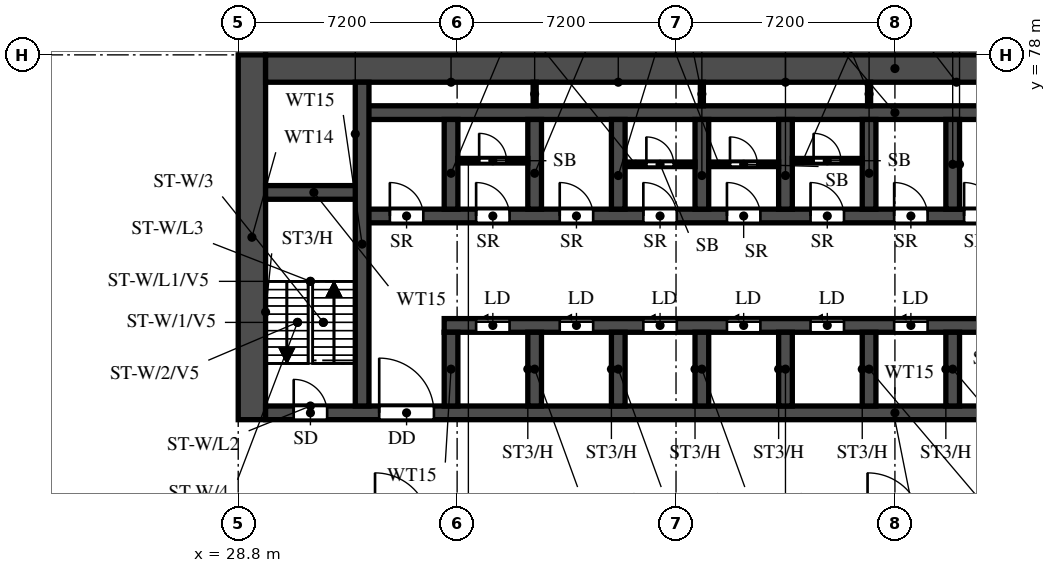
"""IFC4 building model, lengths in metres.
Left out: names, types, materials, properties, quantities, classifications, styles, units other than length and angle.
Written with IfcOpenShell. Run it as: python <this file> out.ifc"""

import sys

from ifc_helpers import new_model, si_unit, direction, frame, frame_2d, origin, place, context, subcontext, project, spatial, rectangle, extrude, element, fill, save


model = new_model("IFC4")
c1 = context("Model", 3, precision=1e-05, world=origin(), true_north=direction((0.0, 1.0)))
c2 = subcontext(c1, "Body", "Model", "MODEL_VIEW")
j1 = project(units=[si_unit("LENGTHUNIT", "METRE"), si_unit("PLANEANGLEUNIT", "RADIAN")], contexts=[c1])
p1 = place(None, origin())
s1 = spatial("IfcSite", under=j1, at=p1, CompositionType="ELEMENT")
p2 = place(p1, origin())
s2 = spatial("IfcBuilding", under=s1, at=p2, CompositionType="ELEMENT")
p3 = place(p2, origin())
s3 = spatial("IfcBuildingStorey", under=s2, at=p3, CompositionType="ELEMENT", Elevation=0.0)
p4 = place(p3, frame((29.25, 66.0, 0.0), z_axis=(0.0, 0.0, 1.0), x_axis=(0.0, 1.0, 0.0)))
e1 = element("IfcWall", 1, at=p4, inside=s3, PredefinedType="SHEAR", context=c2, shape_type="SweptSolid", body=[
    extrude(rectangle(XDim=12.0, YDim=0.9, at=frame_2d((6.0, 0.0))), origin(), (0.0, 0.0, 1.0), 7.4),
])
p5 = place(p3, frame((29.7, 77.55, 0.0), z_axis=(0.0, 0.0, 1.0), x_axis=(1.0, 0.0, 0.0)))
e2 = element("IfcWall", 2, at=p5, inside=s3, PredefinedType="SHEAR", context=c2, shape_type="SweptSolid", body=[
    extrude(rectangle(XDim=41.4, YDim=0.9, at=frame_2d((20.7, 0.0))), origin(), (0.0, 0.0, 1.0), 7.4),
])
p6 = place(p3, frame((29.7, 66.225, 0.0), z_axis=(0.0, 0.0, 1.0), x_axis=(1.0, 0.0, 0.0)))
e3 = element("IfcWall", 3, at=p6, inside=s3, PredefinedType="SHEAR", context=c2, shape_type="SweptSolid", body=[
    extrude(rectangle(XDim=41.4, YDim=0.45, at=frame_2d((20.7, 0.0))), origin(), (0.0, 0.0, 1.0), 7.4),
])
p7 = place(p6, frame((0.925, 0.0, 0.0)))
e4 = element("IfcOpeningElement", 4, at=p7, cuts=e3, PredefinedType="OPENING", context=c2, shape_type="SweptSolid", body=[
    extrude(rectangle(XDim=1.1, YDim=2.1, at=frame_2d((0.55, 1.05))), frame((0.0, 0.235, 0.0), z_axis=(0.0, -1.0, 0.0), x_axis=(1.0, 0.0, 0.0)), (0.0, 0.0, 1.0), 0.47),
])
p8 = place(p6, frame((3.738, 0.0, 0.0)))
e5 = element("IfcOpeningElement", 5, at=p8, cuts=e3, PredefinedType="OPENING", context=c2, shape_type="SweptSolid", body=[
    extrude(rectangle(XDim=1.8, YDim=2.1, at=frame_2d((0.9, 1.05))), frame((0.0, 0.235, 0.0), z_axis=(0.0, -1.0, 0.0), x_axis=(1.0, 0.0, 0.0)), (0.0, 0.0, 1.0), 0.47),
])
p9 = place(p3, frame((35.575, 69.1, 0.0), z_axis=(0.0, 0.0, 1.0), x_axis=(1.0, 0.0, 0.0)))
e6 = element("IfcWall", 6, at=p9, inside=s3, PredefinedType="SHEAR", context=c2, shape_type="SweptSolid", body=[
    extrude(rectangle(XDim=24.2, YDim=0.45, at=frame_2d((12.1, 0.0))), origin(), (0.0, 0.0, 1.0), 7.4),
])
p10 = place(p9, frame((1.05, 0.0, 0.0)))
e7 = element("IfcOpeningElement", 7, at=p10, cuts=e6, PredefinedType="OPENING", context=c2, shape_type="SweptSolid", body=[
    extrude(rectangle(XDim=1.1, YDim=2.1, at=frame_2d((0.55, 1.05))), frame((0.0, 0.235, 0.0), z_axis=(0.0, -1.0, 0.0), x_axis=(1.0, 0.0, 0.0)), (0.0, 0.0, 1.0), 0.47),
])
p11 = place(p9, frame((3.8, 0.0, 0.0)))
e8 = element("IfcOpeningElement", 8, at=p11, cuts=e6, PredefinedType="OPENING", context=c2, shape_type="SweptSolid", body=[
    extrude(rectangle(XDim=1.1, YDim=2.1, at=frame_2d((0.55, 1.05))), frame((0.0, 0.235, 0.0), z_axis=(0.0, -1.0, 0.0), x_axis=(1.0, 0.0, 0.0)), (0.0, 0.0, 1.0), 0.47),
])
p12 = place(p9, frame((6.55, 0.0, 0.0)))
e9 = element("IfcOpeningElement", 9, at=p12, cuts=e6, PredefinedType="OPENING", context=c2, shape_type="SweptSolid", body=[
    extrude(rectangle(XDim=1.1, YDim=2.1, at=frame_2d((0.55, 1.05))), frame((0.0, 0.235, 0.0), z_axis=(0.0, -1.0, 0.0), x_axis=(1.0, 0.0, 0.0)), (0.0, 0.0, 1.0), 0.47),
])
p13 = place(p9, frame((9.3, 0.0, 0.0)))
e10 = element("IfcOpeningElement", 10, at=p13, cuts=e6, PredefinedType="OPENING", context=c2, shape_type="SweptSolid", body=[
    extrude(rectangle(XDim=1.1, YDim=2.1, at=frame_2d((0.55, 1.05))), frame((0.0, 0.235, 0.0), z_axis=(0.0, -1.0, 0.0), x_axis=(1.0, 0.0, 0.0)), (0.0, 0.0, 1.0), 0.47),
])
p14 = place(p9, frame((12.05, 0.0, 0.0)))
e11 = element("IfcOpeningElement", 11, at=p14, cuts=e6, PredefinedType="OPENING", context=c2, shape_type="SweptSolid", body=[
    extrude(rectangle(XDim=1.1, YDim=2.1, at=frame_2d((0.55, 1.05))), frame((0.0, 0.235, 0.0), z_axis=(0.0, -1.0, 0.0), x_axis=(1.0, 0.0, 0.0)), (0.0, 0.0, 1.0), 0.47),
])
p15 = place(p9, frame((14.8, 0.0, 0.0)))
e12 = element("IfcOpeningElement", 12, at=p15, cuts=e6, PredefinedType="OPENING", context=c2, shape_type="SweptSolid", body=[
    extrude(rectangle(XDim=1.1, YDim=2.1, at=frame_2d((0.55, 1.05))), frame((0.0, 0.235, 0.0), z_axis=(0.0, -1.0, 0.0), x_axis=(1.0, 0.0, 0.0)), (0.0, 0.0, 1.0), 0.47),
])
p16 = place(p9, frame((17.675, 0.0, 0.0)))
e13 = element("IfcOpeningElement", 13, at=p16, cuts=e6, PredefinedType="OPENING", context=c2, shape_type="SweptSolid", body=[
    extrude(rectangle(XDim=1.1, YDim=2.1, at=frame_2d((0.55, 1.05))), frame((0.0, 0.235, 0.0), z_axis=(0.0, -1.0, 0.0), x_axis=(1.0, 0.0, 0.0)), (0.0, 0.0, 1.0), 0.47),
])
p17 = place(p9, frame((20.675, 0.0, 0.0)))
e14 = element("IfcOpeningElement", 14, at=p17, cuts=e6, PredefinedType="OPENING", context=c2, shape_type="SweptSolid", body=[
    extrude(rectangle(XDim=1.1, YDim=2.1, at=frame_2d((0.55, 1.05))), frame((0.0, 0.235, 0.0), z_axis=(0.0, -1.0, 0.0), x_axis=(1.0, 0.0, 0.0)), (0.0, 0.0, 1.0), 0.47),
])
p18 = place(p3, frame((32.875, 72.7, 0.0), z_axis=(0.0, 0.0, 1.0), x_axis=(1.0, 0.0, 0.0)))
e15 = element("IfcWall", 15, at=p18, inside=s3, PredefinedType="SHEAR", context=c2, shape_type="SweptSolid", body=[
    extrude(rectangle(XDim=35.05, YDim=0.45, at=frame_2d((17.525, 0.0))), origin(), (0.0, 0.0, 1.0), 7.4),
])
p19 = place(p18, frame((19.8, 0.0, 0.0)))
e16 = element("IfcOpeningElement", 16, at=p19, cuts=e15, PredefinedType="OPENING", context=c2, shape_type="SweptSolid", body=[
    extrude(rectangle(XDim=1.1, YDim=2.1, at=frame_2d((0.55, 1.05))), frame((0.0, 0.235, 0.0), z_axis=(0.0, -1.0, 0.0), x_axis=(1.0, 0.0, 0.0)), (0.0, 0.0, 1.0), 0.47),
])
p20 = place(p18, frame((27.65, 0.0, 0.0)))
e17 = element("IfcOpeningElement", 17, at=p20, cuts=e15, PredefinedType="OPENING", context=c2, shape_type="SweptSolid", body=[
    extrude(rectangle(XDim=1.1, YDim=2.1, at=frame_2d((0.55, 1.05))), frame((0.0, 0.235, 0.0), z_axis=(0.0, -1.0, 0.0), x_axis=(1.0, 0.0, 0.0)), (0.0, 0.0, 1.0), 0.47),
])
p21 = place(p18, frame((30.25, 0.0, 0.0)))
e18 = element("IfcOpeningElement", 18, at=p21, cuts=e15, PredefinedType="OPENING", context=c2, shape_type="SweptSolid", body=[
    extrude(rectangle(XDim=1.1, YDim=2.1, at=frame_2d((0.55, 1.05))), frame((0.0, 0.235, 0.0), z_axis=(0.0, -1.0, 0.0), x_axis=(1.0, 0.0, 0.0)), (0.0, 0.0, 1.0), 0.47),
])
p22 = place(p18, frame((3.75, 0.0, 0.0)))
e19 = element("IfcOpeningElement", 19, at=p22, cuts=e15, PredefinedType="OPENING", context=c2, shape_type="SweptSolid", body=[
    extrude(rectangle(XDim=1.1, YDim=2.1, at=frame_2d((0.55, 1.05))), frame((0.0, 0.235, 0.0), z_axis=(0.0, -1.0, 0.0), x_axis=(1.0, 0.0, 0.0)), (0.0, 0.0, 1.0), 0.47),
])
p23 = place(p18, frame((6.5, 0.0, 0.0)))
e20 = element("IfcOpeningElement", 20, at=p23, cuts=e15, PredefinedType="OPENING", context=c2, shape_type="SweptSolid", body=[
    extrude(rectangle(XDim=1.1, YDim=2.1, at=frame_2d((0.55, 1.05))), frame((0.0, 0.235, 0.0), z_axis=(0.0, -1.0, 0.0), x_axis=(1.0, 0.0, 0.0)), (0.0, 0.0, 1.0), 0.47),
])
p24 = place(p18, frame((9.25, 0.0, 0.0)))
e21 = element("IfcOpeningElement", 21, at=p24, cuts=e15, PredefinedType="OPENING", context=c2, shape_type="SweptSolid", body=[
    extrude(rectangle(XDim=1.1, YDim=2.1, at=frame_2d((0.55, 1.05))), frame((0.0, 0.235, 0.0), z_axis=(0.0, -1.0, 0.0), x_axis=(1.0, 0.0, 0.0)), (0.0, 0.0, 1.0), 0.47),
])
p25 = place(p18, frame((12.0, 0.0, 0.0)))
e22 = element("IfcOpeningElement", 22, at=p25, cuts=e15, PredefinedType="OPENING", context=c2, shape_type="SweptSolid", body=[
    extrude(rectangle(XDim=1.1, YDim=2.1, at=frame_2d((0.55, 1.05))), frame((0.0, 0.235, 0.0), z_axis=(0.0, -1.0, 0.0), x_axis=(1.0, 0.0, 0.0)), (0.0, 0.0, 1.0), 0.47),
])
p26 = place(p18, frame((14.75, 0.0, 0.0)))
e23 = element("IfcOpeningElement", 23, at=p26, cuts=e15, PredefinedType="OPENING", context=c2, shape_type="SweptSolid", body=[
    extrude(rectangle(XDim=1.1, YDim=2.1, at=frame_2d((0.55, 1.05))), frame((0.0, 0.235, 0.0), z_axis=(0.0, -1.0, 0.0), x_axis=(1.0, 0.0, 0.0)), (0.0, 0.0, 1.0), 0.47),
])
p27 = place(p18, frame((17.5, 0.0, 0.0)))
e24 = element("IfcOpeningElement", 24, at=p27, cuts=e15, PredefinedType="OPENING", context=c2, shape_type="SweptSolid", body=[
    extrude(rectangle(XDim=1.1, YDim=2.1, at=frame_2d((0.55, 1.05))), frame((0.0, 0.235, 0.0), z_axis=(0.0, -1.0, 0.0), x_axis=(1.0, 0.0, 0.0)), (0.0, 0.0, 1.0), 0.47),
])
p28 = place(p18, frame((0.913, 0.0, 0.0)))
e25 = element("IfcOpeningElement", 25, at=p28, cuts=e15, PredefinedType="OPENING", context=c2, shape_type="SweptSolid", body=[
    extrude(rectangle(XDim=1.1, YDim=2.1, at=frame_2d((0.55, 1.05))), frame((0.0, 0.235, 0.0), z_axis=(0.0, -1.0, 0.0), x_axis=(1.0, 0.0, 0.0)), (0.0, 0.0, 1.0), 0.47),
])
p29 = place(p3, frame((32.875, 76.1, 0.0), z_axis=(0.0, 0.0, 1.0), x_axis=(1.0, 0.0, 0.0)))
e26 = element("IfcWall", 26, at=p29, inside=s3, PredefinedType="SHEAR", context=c2, shape_type="SweptSolid", body=[
    extrude(rectangle(XDim=35.05, YDim=0.45, at=frame_2d((17.525, 0.0))), origin(), (0.0, 0.0, 1.0), 7.4),
])
p30 = place(p3, frame((29.7, 73.475, 0.0), z_axis=(0.0, 0.0, 1.0), x_axis=(1.0, 0.0, 0.0)))
e27 = element("IfcWall", 27, at=p30, inside=s3, PredefinedType="SHEAR", context=c2, shape_type="SweptSolid", body=[
    extrude(rectangle(XDim=3.175, YDim=0.45, at=frame_2d((1.587, 0.0))), origin(), (0.0, 0.0, 1.0), 7.4),
])
p31 = place(p3, frame((32.875, 66.45, 0.0), z_axis=(0.0, 0.0, 1.0), x_axis=(0.0, 1.0, 0.0)))
e28 = element("IfcWall", 28, at=p31, inside=s3, PredefinedType="SHEAR", context=c2, shape_type="SweptSolid", body=[
    extrude(rectangle(XDim=10.65, YDim=0.45, at=frame_2d((5.325, 0.0))), origin(), (0.0, 0.0, 1.0), 7.4),
])
for number, where, z_axis, x_axis in (
    (29, (35.8, 66.45, 0.0), (0.0, 0.0, 1.0), (0.0, 1.0, 0.0)),
    (30, (38.55, 66.45, 0.0), (0.0, 0.0, 1.0), (0.0, 1.0, 0.0)),
    (31, (41.3, 66.45, 0.0), (0.0, 0.0, 1.0), (0.0, 1.0, 0.0)),
    (32, (44.05, 66.45, 0.0), (0.0, 0.0, 1.0), (0.0, 1.0, 0.0)),
    (33, (46.8, 66.45, 0.0), (0.0, 0.0, 1.0), (0.0, 1.0, 0.0)),
    (34, (49.55, 66.45, 0.0), (0.0, 0.0, 1.0), (0.0, 1.0, 0.0)),
    (35, (52.3, 66.45, 0.0), (0.0, 0.0, 1.0), (0.0, 1.0, 0.0)),
):
    element("IfcWall", number, at=place(p3, frame(where, z_axis=z_axis, x_axis=x_axis)), inside=s3, PredefinedType="SHEAR", context=c2, shape_type="SweptSolid", body=[
        extrude(rectangle(XDim=2.425, YDim=0.45, at=frame_2d((1.212, 0.0))), origin(), (0.0, 0.0, 1.0), 7.4),
    ])
for number, where, z_axis, x_axis in (
    (36, (35.8, 72.925, 0.0), (0.0, 0.0, 1.0), (0.0, 1.0, 0.0)),
    (37, (38.55, 72.925, 0.0), (0.0, 0.0, 1.0), (0.0, 1.0, 0.0)),
    (38, (41.3, 72.925, 0.0), (0.0, 0.0, 1.0), (0.0, 1.0, 0.0)),
    (39, (44.05, 72.925, 0.0), (0.0, 0.0, 1.0), (0.0, 1.0, 0.0)),
    (40, (46.8, 72.925, 0.0), (0.0, 0.0, 1.0), (0.0, 1.0, 0.0)),
    (41, (49.55, 72.925, 0.0), (0.0, 0.0, 1.0), (0.0, 1.0, 0.0)),
    (42, (52.3, 72.925, 0.0), (0.0, 0.0, 1.0), (0.0, 1.0, 0.0)),
):
    element("IfcWall", number, at=place(p3, frame(where, z_axis=z_axis, x_axis=x_axis)), inside=s3, PredefinedType="SHEAR", context=c2, shape_type="SweptSolid", body=[
        extrude(rectangle(XDim=2.95, YDim=0.45, at=frame_2d((1.475, 0.0))), origin(), (0.0, 0.0, 1.0), 7.4),
    ])
p32 = place(p3, frame((36.025, 74.518, 0.0), z_axis=(0.0, 0.0, 1.0), x_axis=(1.0, 0.0, 0.0)))
e43 = element("IfcWall", 43, at=p32, inside=s3, PredefinedType="PARTITIONING", context=c2, shape_type="SweptSolid", body=[
    extrude(rectangle(XDim=2.3, YDim=0.15, at=frame_2d((1.15, 0.0))), origin(), (0.0, 0.0, 1.0), 7.4),
])
p33 = place(p32, frame((0.7, 0.0, 0.0)))
e44 = element("IfcOpeningElement", 44, at=p33, cuts=e43, PredefinedType="OPENING", context=c2, shape_type="SweptSolid", body=[
    extrude(rectangle(XDim=0.9, YDim=2.1, at=frame_2d((0.45, 1.05))), frame((0.0, 0.085, 0.0), z_axis=(0.0, -1.0, 0.0), x_axis=(1.0, 0.0, 0.0)), (0.0, 0.0, 1.0), 0.17),
])
p34 = place(p3, frame((41.525, 74.4, 0.0), z_axis=(0.0, 0.0, 1.0), x_axis=(1.0, 0.0, 0.0)))
e45 = element("IfcWall", 45, at=p34, inside=s3, PredefinedType="PARTITIONING", context=c2, shape_type="SweptSolid", body=[
    extrude(rectangle(XDim=2.3, YDim=0.15, at=frame_2d((1.15, 0.0))), origin(), (0.0, 0.0, 1.0), 7.4),
])
p35 = place(p34, frame((0.7, 0.0, 0.0)))
e46 = element("IfcOpeningElement", 46, at=p35, cuts=e45, PredefinedType="OPENING", context=c2, shape_type="SweptSolid", body=[
    extrude(rectangle(XDim=0.9, YDim=2.1, at=frame_2d((0.45, 1.05))), frame((0.0, 0.085, 0.0), z_axis=(0.0, -1.0, 0.0), x_axis=(1.0, 0.0, 0.0)), (0.0, 0.0, 1.0), 0.17),
])
p36 = place(p3, frame((44.275, 74.4, 0.0), z_axis=(0.0, 0.0, 1.0), x_axis=(1.0, 0.0, 0.0)))
e47 = element("IfcWall", 47, at=p36, inside=s3, PredefinedType="PARTITIONING", context=c2, shape_type="SweptSolid", body=[
    extrude(rectangle(XDim=2.3, YDim=0.15, at=frame_2d((1.15, 0.0))), origin(), (0.0, 0.0, 1.0), 7.4),
])
p37 = place(p36, frame((0.7, 0.0, 0.0)))
e48 = element("IfcOpeningElement", 48, at=p37, cuts=e47, PredefinedType="OPENING", context=c2, shape_type="SweptSolid", body=[
    extrude(rectangle(XDim=0.9, YDim=2.1, at=frame_2d((0.45, 1.05))), frame((0.0, 0.085, 0.0), z_axis=(0.0, -1.0, 0.0), x_axis=(1.0, 0.0, 0.0)), (0.0, 0.0, 1.0), 0.17),
])
p38 = place(p3, frame((47.025, 74.518, 0.0), z_axis=(0.0, 0.0, 1.0), x_axis=(1.0, 0.0, 0.0)))
e49 = element("IfcWall", 49, at=p38, inside=s3, PredefinedType="PARTITIONING", context=c2, shape_type="SweptSolid", body=[
    extrude(rectangle(XDim=2.3, YDim=0.15, at=frame_2d((1.15, 0.0))), origin(), (0.0, 0.0, 1.0), 7.4),
])
p39 = place(p38, frame((0.7, 0.0, 0.0)))
e50 = element("IfcOpeningElement", 50, at=p39, cuts=e49, PredefinedType="OPENING", context=c2, shape_type="SweptSolid", body=[
    extrude(rectangle(XDim=0.9, YDim=2.1, at=frame_2d((0.45, 1.05))), frame((0.0, 0.085, 0.0), z_axis=(0.0, -1.0, 0.0), x_axis=(1.0, 0.0, 0.0)), (0.0, 0.0, 1.0), 0.17),
])
for number, where, z_axis, x_axis in (
    (51, (38.55, 76.325, 0.0), (0.0, 0.0, 1.0), (0.0, 1.0, 0.0)),
    (52, (44.05, 76.325, 0.0), (0.0, 0.0, 1.0), (0.0, 1.0, 0.0)),
    (53, (49.55, 76.325, 0.0), (0.0, 0.0, 1.0), (0.0, 1.0, 0.0)),
):
    element("IfcWall", number, at=place(p3, frame(where, z_axis=z_axis, x_axis=x_axis)), inside=s3, PredefinedType="PARTITIONING", context=c2, shape_type="SweptSolid", body=[
        extrude(rectangle(XDim=0.775, YDim=0.1, at=frame_2d((0.388, 0.0))), origin(), (0.0, 0.0, 1.0), 7.4),
    ])
p40 = place(p7, origin())
e54 = element("IfcDoor", 54, at=p40, inside=s3, OperationType="SINGLE_SWING_LEFT", PredefinedType="DOOR", context=c2, shape_type="SweptSolid", body=[
    extrude(rectangle(XDim=1.1, YDim=2.1, at=frame_2d((0.55, 1.05))), frame((0.0, 0.025, 0.0), z_axis=(0.0, -1.0, 0.0), x_axis=(1.0, 0.0, 0.0)), (0.0, 0.0, 1.0), 0.05),
])
fill(e4, e54)
p41 = place(p19, origin())
e55 = element("IfcDoor", 55, at=p41, inside=s3, OperationType="SINGLE_SWING_LEFT", PredefinedType="DOOR", context=c2, shape_type="SweptSolid", body=[
    extrude(rectangle(XDim=1.1, YDim=2.1, at=frame_2d((0.55, 1.05))), frame((0.0, 0.025, 0.0), z_axis=(0.0, -1.0, 0.0), x_axis=(1.0, 0.0, 0.0)), (0.0, 0.0, 1.0), 0.05),
])
fill(e16, e55)
p42 = place(p8, origin())
e56 = element("IfcDoor", 56, at=p42, inside=s3, OperationType="DOUBLE_DOOR_SINGLE_SWING", PredefinedType="DOOR", context=c2, shape_type="SweptSolid", body=[
    extrude(rectangle(XDim=1.8, YDim=2.1, at=frame_2d((0.9, 1.05))), frame((0.0, 0.025, 0.0), z_axis=(0.0, -1.0, 0.0), x_axis=(1.0, 0.0, 0.0)), (0.0, 0.0, 1.0), 0.05),
])
fill(e5, e56)
p43 = place(p10, origin())
e57 = element("IfcDoor", 57, at=p43, inside=s3, OperationType="SLIDING_TO_LEFT", PredefinedType="DOOR", context=c2, shape_type="SweptSolid", body=[
    extrude(rectangle(XDim=1.1, YDim=2.1, at=frame_2d((0.55, 1.05))), frame((0.0, 0.025, 0.0), z_axis=(0.0, -1.0, 0.0), x_axis=(1.0, 0.0, 0.0)), (0.0, 0.0, 1.0), 0.05),
])
fill(e7, e57)
p44 = place(p11, origin())
e58 = element("IfcDoor", 58, at=p44, inside=s3, OperationType="SLIDING_TO_LEFT", PredefinedType="DOOR", context=c2, shape_type="SweptSolid", body=[
    extrude(rectangle(XDim=1.1, YDim=2.1, at=frame_2d((0.55, 1.05))), frame((0.0, 0.025, 0.0), z_axis=(0.0, -1.0, 0.0), x_axis=(1.0, 0.0, 0.0)), (0.0, 0.0, 1.0), 0.05),
])
fill(e8, e58)
p45 = place(p12, origin())
e59 = element("IfcDoor", 59, at=p45, inside=s3, OperationType="SLIDING_TO_LEFT", PredefinedType="DOOR", context=c2, shape_type="SweptSolid", body=[
    extrude(rectangle(XDim=1.1, YDim=2.1, at=frame_2d((0.55, 1.05))), frame((0.0, 0.025, 0.0), z_axis=(0.0, -1.0, 0.0), x_axis=(1.0, 0.0, 0.0)), (0.0, 0.0, 1.0), 0.05),
])
fill(e9, e59)
p46 = place(p13, origin())
e60 = element("IfcDoor", 60, at=p46, inside=s3, OperationType="SLIDING_TO_LEFT", PredefinedType="DOOR", context=c2, shape_type="SweptSolid", body=[
    extrude(rectangle(XDim=1.1, YDim=2.1, at=frame_2d((0.55, 1.05))), frame((0.0, 0.025, 0.0), z_axis=(0.0, -1.0, 0.0), x_axis=(1.0, 0.0, 0.0)), (0.0, 0.0, 1.0), 0.05),
])
fill(e10, e60)
p47 = place(p14, origin())
e61 = element("IfcDoor", 61, at=p47, inside=s3, OperationType="SLIDING_TO_LEFT", PredefinedType="DOOR", context=c2, shape_type="SweptSolid", body=[
    extrude(rectangle(XDim=1.1, YDim=2.1, at=frame_2d((0.55, 1.05))), frame((0.0, 0.025, 0.0), z_axis=(0.0, -1.0, 0.0), x_axis=(1.0, 0.0, 0.0)), (0.0, 0.0, 1.0), 0.05),
])
fill(e11, e61)
p48 = place(p15, origin())
e62 = element("IfcDoor", 62, at=p48, inside=s3, OperationType="SLIDING_TO_LEFT", PredefinedType="DOOR", context=c2, shape_type="SweptSolid", body=[
    extrude(rectangle(XDim=1.1, YDim=2.1, at=frame_2d((0.55, 1.05))), frame((0.0, 0.025, 0.0), z_axis=(0.0, -1.0, 0.0), x_axis=(1.0, 0.0, 0.0)), (0.0, 0.0, 1.0), 0.05),
])
fill(e12, e62)
p49 = place(p22, origin())
e63 = element("IfcDoor", 63, at=p49, inside=s3, OperationType="SINGLE_SWING_LEFT", PredefinedType="DOOR", context=c2, shape_type="SweptSolid", body=[
    extrude(rectangle(XDim=1.1, YDim=2.1, at=frame_2d((0.55, 1.05))), frame((0.0, 0.025, 0.0), z_axis=(0.0, -1.0, 0.0), x_axis=(1.0, 0.0, 0.0)), (0.0, 0.0, 1.0), 0.05),
])
fill(e19, e63)
p50 = place(p33, origin())
e64 = element("IfcDoor", 64, at=p50, inside=s3, OperationType="SINGLE_SWING_RIGHT", PredefinedType="DOOR", context=c2, shape_type="SweptSolid", body=[
    extrude(rectangle(XDim=0.9, YDim=2.1, at=frame_2d((0.45, 1.05))), frame((0.0, 0.025, 0.0), z_axis=(0.0, -1.0, 0.0), x_axis=(1.0, 0.0, 0.0)), (0.0, 0.0, 1.0), 0.05),
])
fill(e44, e64)
p51 = place(p23, origin())
e65 = element("IfcDoor", 65, at=p51, inside=s3, OperationType="SINGLE_SWING_LEFT", PredefinedType="DOOR", context=c2, shape_type="SweptSolid", body=[
    extrude(rectangle(XDim=1.1, YDim=2.1, at=frame_2d((0.55, 1.05))), frame((0.0, 0.025, 0.0), z_axis=(0.0, -1.0, 0.0), x_axis=(1.0, 0.0, 0.0)), (0.0, 0.0, 1.0), 0.05),
])
fill(e20, e65)
p52 = place(p24, origin())
e66 = element("IfcDoor", 66, at=p52, inside=s3, OperationType="SINGLE_SWING_LEFT", PredefinedType="DOOR", context=c2, shape_type="SweptSolid", body=[
    extrude(rectangle(XDim=1.1, YDim=2.1, at=frame_2d((0.55, 1.05))), frame((0.0, 0.025, 0.0), z_axis=(0.0, -1.0, 0.0), x_axis=(1.0, 0.0, 0.0)), (0.0, 0.0, 1.0), 0.05),
])
fill(e21, e66)
p53 = place(p35, origin())
e67 = element("IfcDoor", 67, at=p53, inside=s3, OperationType="SINGLE_SWING_LEFT", PredefinedType="DOOR", context=c2, shape_type="SweptSolid", body=[
    extrude(rectangle(XDim=0.9, YDim=2.1, at=frame_2d((0.45, 1.05))), frame((0.0, 0.025, 0.0), z_axis=(0.0, -1.0, 0.0), x_axis=(1.0, 0.0, 0.0)), (0.0, 0.0, 1.0), 0.05),
])
fill(e46, e67)
p54 = place(p25, origin())
e68 = element("IfcDoor", 68, at=p54, inside=s3, OperationType="SINGLE_SWING_LEFT", PredefinedType="DOOR", context=c2, shape_type="SweptSolid", body=[
    extrude(rectangle(XDim=1.1, YDim=2.1, at=frame_2d((0.55, 1.05))), frame((0.0, 0.025, 0.0), z_axis=(0.0, -1.0, 0.0), x_axis=(1.0, 0.0, 0.0)), (0.0, 0.0, 1.0), 0.05),
])
fill(e22, e68)
p55 = place(p37, origin())
e69 = element("IfcDoor", 69, at=p55, inside=s3, OperationType="SINGLE_SWING_RIGHT", PredefinedType="DOOR", context=c2, shape_type="SweptSolid", body=[
    extrude(rectangle(XDim=0.9, YDim=2.1, at=frame_2d((0.45, 1.05))), frame((0.0, 0.025, 0.0), z_axis=(0.0, -1.0, 0.0), x_axis=(1.0, 0.0, 0.0)), (0.0, 0.0, 1.0), 0.05),
])
fill(e48, e69)
p56 = place(p26, origin())
e70 = element("IfcDoor", 70, at=p56, inside=s3, OperationType="SINGLE_SWING_LEFT", PredefinedType="DOOR", context=c2, shape_type="SweptSolid", body=[
    extrude(rectangle(XDim=1.1, YDim=2.1, at=frame_2d((0.55, 1.05))), frame((0.0, 0.025, 0.0), z_axis=(0.0, -1.0, 0.0), x_axis=(1.0, 0.0, 0.0)), (0.0, 0.0, 1.0), 0.05),
])
fill(e23, e70)
p57 = place(p39, origin())
e71 = element("IfcDoor", 71, at=p57, inside=s3, OperationType="SINGLE_SWING_RIGHT", PredefinedType="DOOR", context=c2, shape_type="SweptSolid", body=[
    extrude(rectangle(XDim=0.9, YDim=2.1, at=frame_2d((0.45, 1.05))), frame((0.0, 0.025, 0.0), z_axis=(0.0, -1.0, 0.0), x_axis=(1.0, 0.0, 0.0)), (0.0, 0.0, 1.0), 0.05),
])
fill(e50, e71)
p58 = place(p27, origin())
e72 = element("IfcDoor", 72, at=p58, inside=s3, OperationType="SINGLE_SWING_LEFT", PredefinedType="DOOR", context=c2, shape_type="SweptSolid", body=[
    extrude(rectangle(XDim=1.1, YDim=2.1, at=frame_2d((0.55, 1.05))), frame((0.0, 0.025, 0.0), z_axis=(0.0, -1.0, 0.0), x_axis=(1.0, 0.0, 0.0)), (0.0, 0.0, 1.0), 0.05),
])
fill(e24, e72)
p59 = place(p28, origin())
e73 = element("IfcDoor", 73, at=p59, inside=s3, OperationType="SINGLE_SWING_LEFT", PredefinedType="DOOR", context=c2, shape_type="SweptSolid", body=[
    extrude(rectangle(XDim=1.1, YDim=2.1, at=frame_2d((0.55, 1.05))), frame((0.0, 0.025, 0.0), z_axis=(0.0, -1.0, 0.0), x_axis=(1.0, 0.0, 0.0)), (0.0, 0.0, 1.0), 0.05),
])
fill(e25, e73)
save(model, sys.argv[1])
